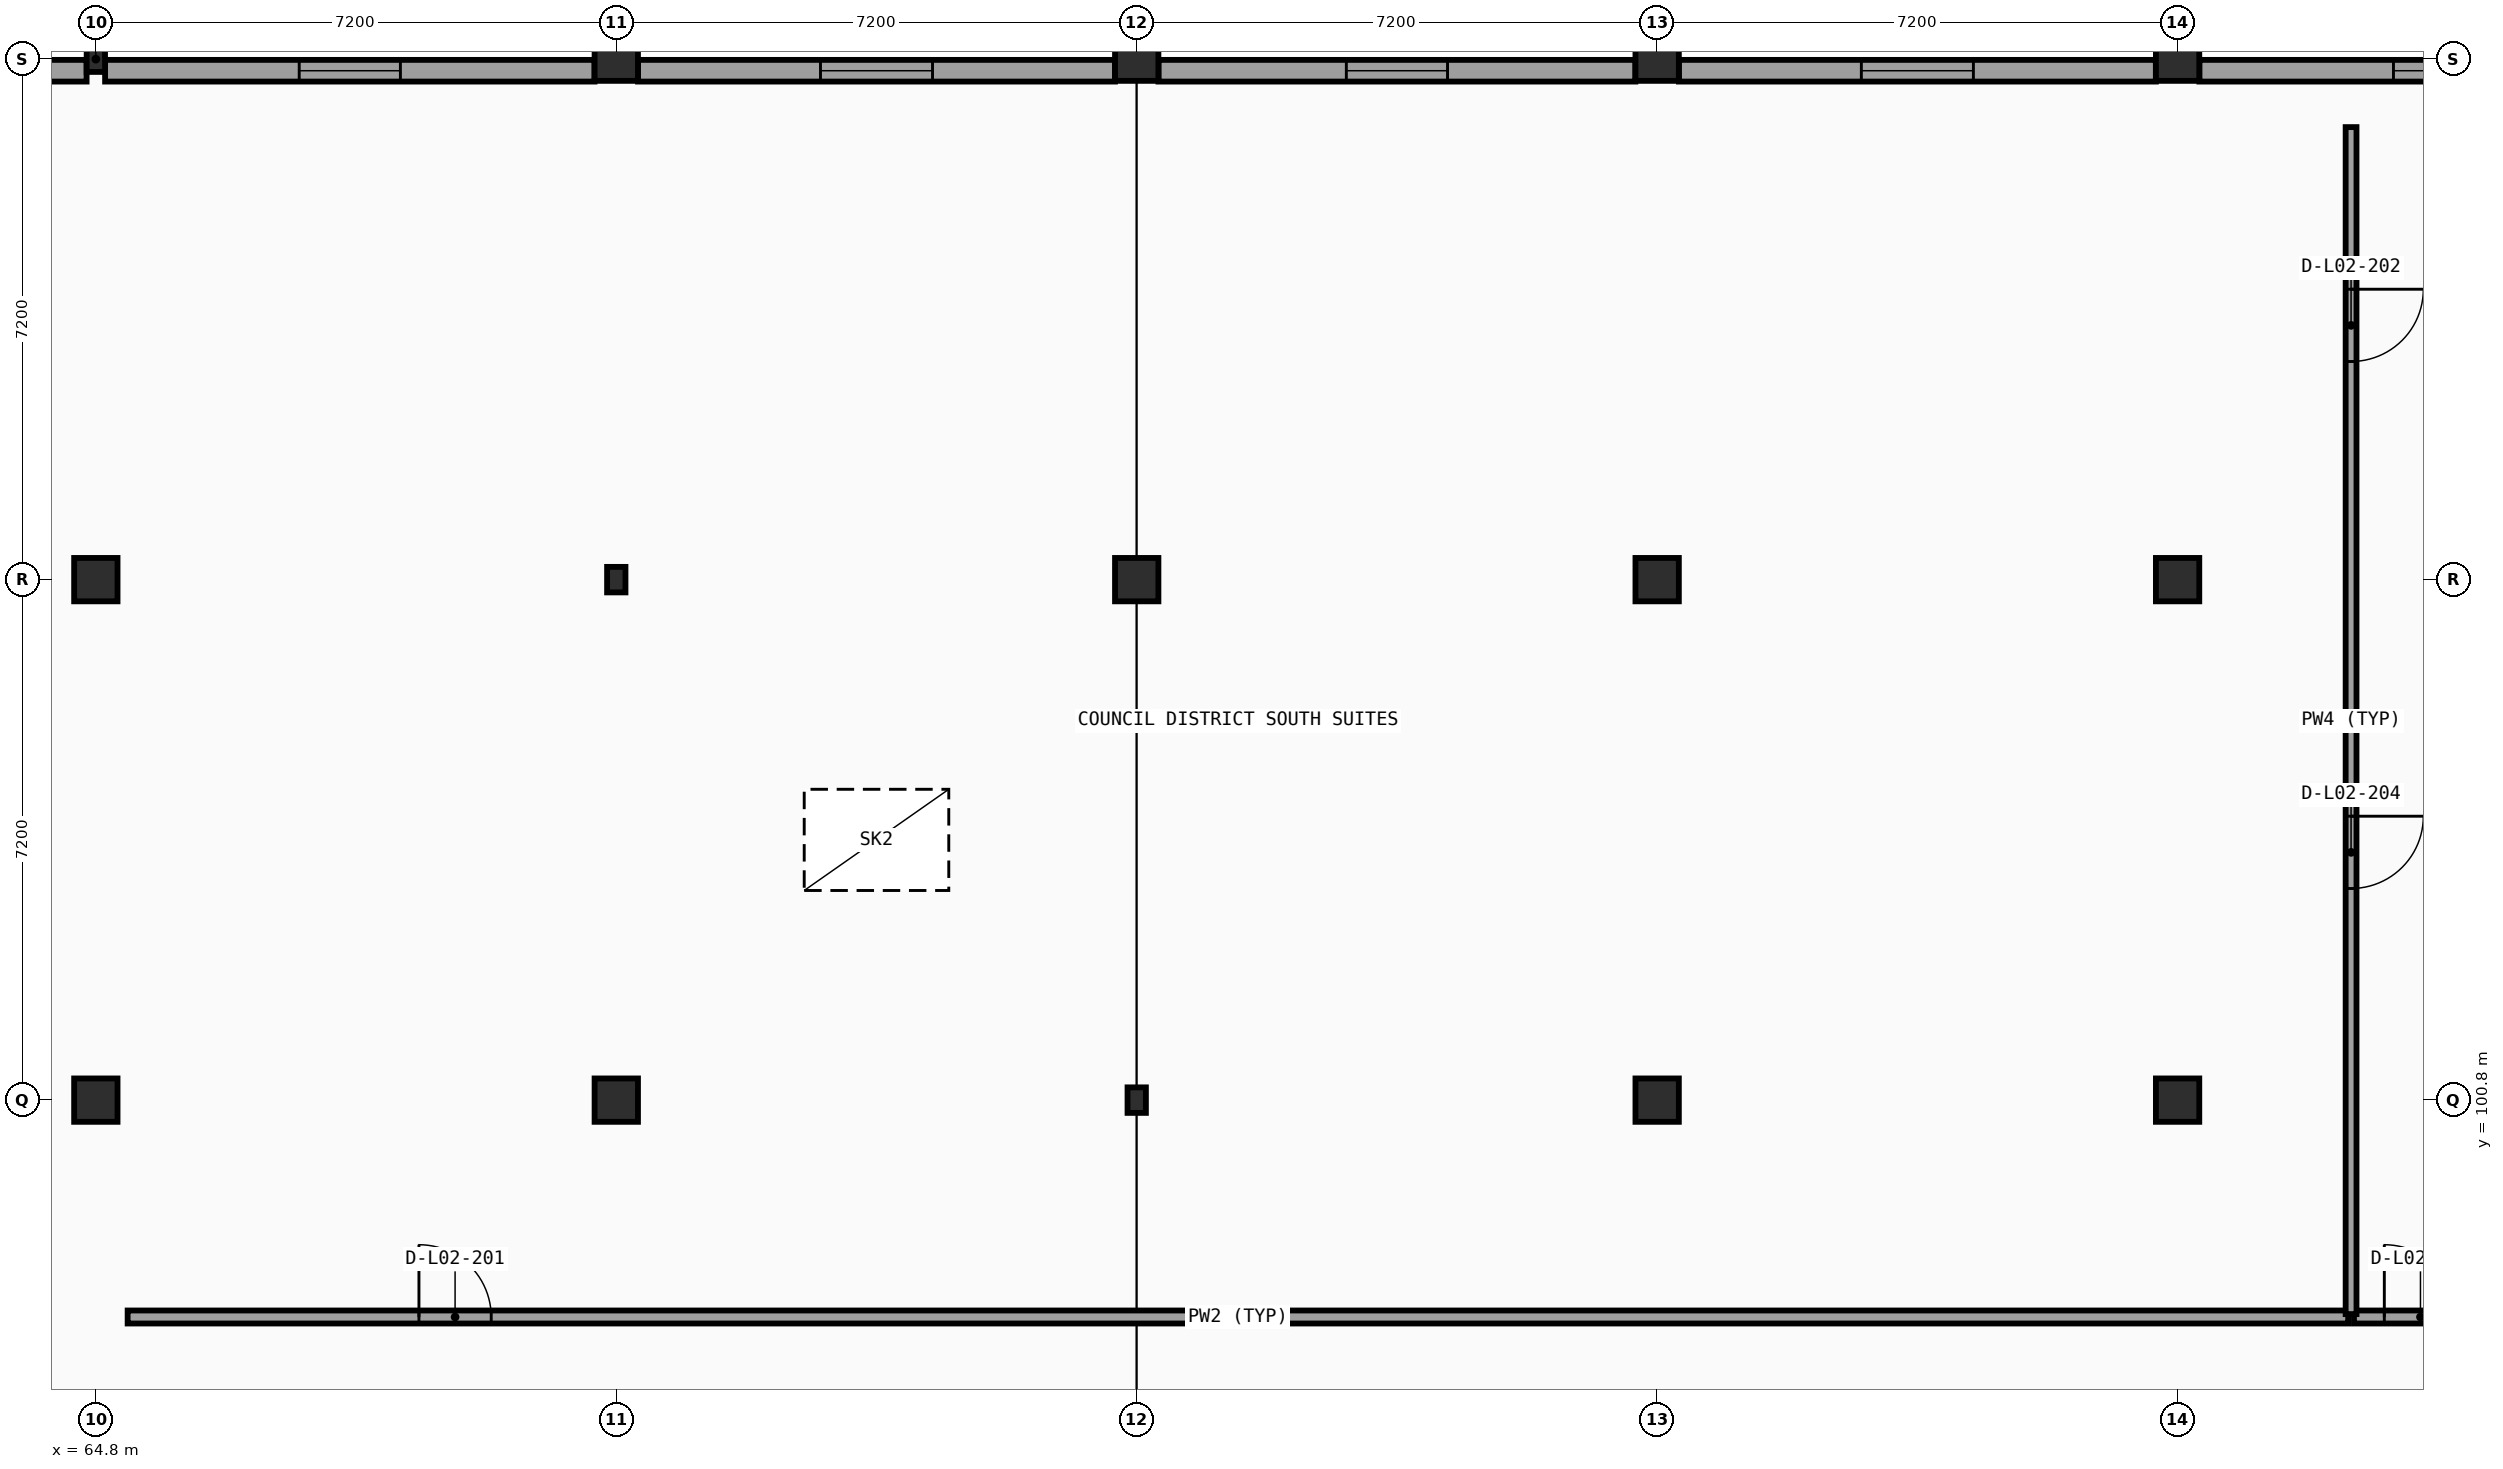
"""IFC4 building model, lengths in metres.
Left out: names, types, materials, properties, quantities, classifications, styles, units other than length and angle.
Written with IfcOpenShell. Run it as: python <this file> out.ifc"""

import sys

from ifc_helpers import new_model, si_unit, direction, frame, frame_2d, origin, origin_2d, place, context, subcontext, project, spatial, rectangle, i_section, extrude, element, fill, save


model = new_model("IFC4")
c1 = context("Model", 3, precision=1e-05, world=origin(), true_north=direction((0.0, 1.0)))
c2 = subcontext(c1, "Body", "Model", "MODEL_VIEW")
j1 = project(units=[si_unit("LENGTHUNIT", "METRE"), si_unit("PLANEANGLEUNIT", "RADIAN")], contexts=[c1])
p1 = place(None, origin())
s1 = spatial("IfcSite", under=j1, at=p1, CompositionType="ELEMENT")
p2 = place(p1, origin())
s2 = spatial("IfcBuilding", under=s1, at=p2, CompositionType="ELEMENT")
p3 = place(p2, frame((0.0, 0.0, 10.2)))
s3 = spatial("IfcBuildingStorey", under=s2, at=p3, CompositionType="ELEMENT", Elevation=10.2)
for number, where, z_axis, x_axis in (
    (1, (64.8, 100.8, 0.0), (0.0, 0.0, 1.0), (1.0, 0.0, 0.0)),
    (2, (64.8, 108.0, 0.0), (0.0, 0.0, 1.0), (1.0, 0.0, 0.0)),
):
    element("IfcColumn", number, at=place(p3, frame(where, z_axis=z_axis, x_axis=x_axis)), inside=s3, PredefinedType="COLUMN", context=c2, shape_type="SweptSolid", body=[
        extrude(rectangle(XDim=0.6, YDim=0.6, at=origin_2d()), origin(), (0.0, 0.0, 1.0), 4.5),
    ])
p4 = place(p3, frame((64.8, 115.2, 0.0), z_axis=(0.0, 0.0, 1.0), x_axis=(1.0, 0.0, 0.0)))
e3 = element("IfcColumn", 3, at=p4, inside=s3, PredefinedType="COLUMN", context=c2, shape_type="SweptSolid", body=[
    extrude(i_section(OverallWidth=0.254, OverallDepth=0.353, WebThickness=0.01, FlangeThickness=0.016, FilletRadius=0.015, at=origin_2d()), origin(), (0.0, 0.0, 1.0), 4.5),
])
p5 = place(p3, frame((72.0, 100.8, 0.0), z_axis=(0.0, 0.0, 1.0), x_axis=(1.0, 0.0, 0.0)))
e4 = element("IfcColumn", 4, at=p5, inside=s3, PredefinedType="COLUMN", context=c2, shape_type="SweptSolid", body=[
    extrude(rectangle(XDim=0.6, YDim=0.6, at=origin_2d()), origin(), (0.0, 0.0, 1.0), 4.5),
])
p6 = place(p3, frame((72.0, 108.0, 0.0), z_axis=(0.0, 0.0, 1.0), x_axis=(1.0, 0.0, 0.0)))
e5 = element("IfcColumn", 5, at=p6, inside=s3, PredefinedType="COLUMN", context=c2, shape_type="SweptSolid", body=[
    extrude(i_section(OverallWidth=0.254, OverallDepth=0.353, WebThickness=0.01, FlangeThickness=0.016, FilletRadius=0.015, at=origin_2d()), origin(), (0.0, 0.0, 1.0), 4.5),
])
p7 = place(p3, frame((72.0, 115.2, 0.0), z_axis=(0.0, 0.0, 1.0), x_axis=(1.0, 0.0, 0.0)))
e6 = element("IfcColumn", 6, at=p7, inside=s3, PredefinedType="COLUMN", context=c2, shape_type="SweptSolid", body=[
    extrude(rectangle(XDim=0.6, YDim=0.6, at=origin_2d()), origin(), (0.0, 0.0, 1.0), 4.5),
])
p8 = place(p3, frame((79.2, 100.8, 0.0), z_axis=(0.0, 0.0, 1.0), x_axis=(1.0, 0.0, 0.0)))
e7 = element("IfcColumn", 7, at=p8, inside=s3, PredefinedType="COLUMN", context=c2, shape_type="SweptSolid", body=[
    extrude(i_section(OverallWidth=0.254, OverallDepth=0.353, WebThickness=0.01, FlangeThickness=0.016, FilletRadius=0.015, at=origin_2d()), origin(), (0.0, 0.0, 1.0), 4.5),
])
for number, where, z_axis, x_axis in (
    (8, (79.2, 108.0, 0.0), (0.0, 0.0, 1.0), (1.0, 0.0, 0.0)),
    (9, (79.2, 115.2, 0.0), (0.0, 0.0, 1.0), (1.0, 0.0, 0.0)),
    (10, (86.4, 100.8, 0.0), (0.0, 0.0, 1.0), (1.0, 0.0, 0.0)),
    (11, (86.4, 108.0, 0.0), (0.0, 0.0, 1.0), (1.0, 0.0, 0.0)),
    (12, (86.4, 115.2, 0.0), (0.0, 0.0, 1.0), (1.0, 0.0, 0.0)),
    (13, (93.6, 100.8, 0.0), (0.0, 0.0, 1.0), (1.0, 0.0, 0.0)),
    (14, (93.6, 108.0, 0.0), (0.0, 0.0, 1.0), (1.0, 0.0, 0.0)),
    (15, (93.6, 115.2, 0.0), (0.0, 0.0, 1.0), (1.0, 0.0, 0.0)),
):
    element("IfcColumn", number, at=place(p3, frame(where, z_axis=z_axis, x_axis=x_axis)), inside=s3, PredefinedType="COLUMN", context=c2, shape_type="SweptSolid", body=[
        extrude(rectangle(XDim=0.6, YDim=0.6, at=origin_2d()), origin(), (0.0, 0.0, 1.0), 4.5),
    ])
p9 = place(p3, frame((57.901, 115.04, 0.0), z_axis=(0.0, 0.0, 1.0), x_axis=(1.0, 0.0, 0.0)))
e16 = element("IfcWall", 16, at=p9, inside=s3, PredefinedType="SOLIDWALL", context=c2, shape_type="SweptSolid", body=[
    extrude(rectangle(XDim=6.771, YDim=0.3, at=frame_2d((3.386, 0.0))), origin(), (0.0, 0.0, 1.0), 3.451),
])
p10 = place(p9, frame((2.611, 0.0, 0.85)))
e17 = element("IfcOpeningElement", 17, at=p10, cuts=e16, PredefinedType="OPENING", context=c2, shape_type="SweptSolid", body=[
    extrude(rectangle(XDim=1.55, YDim=1.65, at=frame_2d((0.775, 0.825))), frame((0.0, 0.16, 0.0), z_axis=(0.0, -1.0, 0.0), x_axis=(1.0, 0.0, 0.0)), (0.0, 0.0, 1.0), 0.32),
])
p11 = place(p3, frame((64.928, 115.04, 0.0), z_axis=(0.0, 0.0, 1.0), x_axis=(1.0, 0.0, 0.0)))
e18 = element("IfcWall", 18, at=p11, inside=s3, PredefinedType="SOLIDWALL", context=c2, shape_type="SweptSolid", body=[
    extrude(rectangle(XDim=6.771, YDim=0.3, at=frame_2d((3.385, 0.0))), origin(), (0.0, 0.0, 1.0), 3.451),
])
p12 = place(p11, frame((2.686, 0.0, 0.85)))
e19 = element("IfcOpeningElement", 19, at=p12, cuts=e18, PredefinedType="OPENING", context=c2, shape_type="SweptSolid", body=[
    extrude(rectangle(XDim=1.4, YDim=1.75, at=frame_2d((0.7, 0.875))), frame((0.0, 0.16, 0.0), z_axis=(0.0, -1.0, 0.0), x_axis=(1.0, 0.0, 0.0)), (0.0, 0.0, 1.0), 0.32),
])
p13 = place(p3, frame((72.301, 115.04, 0.0), z_axis=(0.0, 0.0, 1.0), x_axis=(1.0, 0.0, 0.0)))
e20 = element("IfcWall", 20, at=p13, inside=s3, PredefinedType="SOLIDWALL", context=c2, shape_type="SweptSolid", body=[
    extrude(rectangle(XDim=6.598, YDim=0.3, at=frame_2d((3.299, 0.0))), origin(), (0.0, 0.0, 1.0), 3.471),
])
p14 = place(p13, frame((2.524, 0.0, 0.85)))
e21 = element("IfcOpeningElement", 21, at=p14, cuts=e20, PredefinedType="OPENING", context=c2, shape_type="SweptSolid", body=[
    extrude(rectangle(XDim=1.55, YDim=1.65, at=frame_2d((0.775, 0.825))), frame((0.0, 0.16, 0.0), z_axis=(0.0, -1.0, 0.0), x_axis=(1.0, 0.0, 0.0)), (0.0, 0.0, 1.0), 0.32),
])
p15 = place(p3, frame((79.501, 115.04, 0.0), z_axis=(0.0, 0.0, 1.0), x_axis=(1.0, 0.0, 0.0)))
e22 = element("IfcWall", 22, at=p15, inside=s3, PredefinedType="SOLIDWALL", context=c2, shape_type="SweptSolid", body=[
    extrude(rectangle(XDim=6.598, YDim=0.3, at=frame_2d((3.299, 0.0))), origin(), (0.0, 0.0, 1.0), 3.471),
])
p16 = place(p15, frame((2.599, 0.0, 0.85)))
e23 = element("IfcOpeningElement", 23, at=p16, cuts=e22, PredefinedType="OPENING", context=c2, shape_type="SweptSolid", body=[
    extrude(rectangle(XDim=1.4, YDim=1.75, at=frame_2d((0.7, 0.875))), frame((0.0, 0.16, 0.0), z_axis=(0.0, -1.0, 0.0), x_axis=(1.0, 0.0, 0.0)), (0.0, 0.0, 1.0), 0.32),
])
p17 = place(p3, frame((86.701, 115.04, 0.0), z_axis=(0.0, 0.0, 1.0), x_axis=(1.0, 0.0, 0.0)))
e24 = element("IfcWall", 24, at=p17, inside=s3, PredefinedType="SOLIDWALL", context=c2, shape_type="SweptSolid", body=[
    extrude(rectangle(XDim=6.598, YDim=0.3, at=frame_2d((3.299, 0.0))), origin(), (0.0, 0.0, 1.0), 3.471),
])
p18 = place(p17, frame((2.524, 0.0, 0.85)))
e25 = element("IfcOpeningElement", 25, at=p18, cuts=e24, PredefinedType="OPENING", context=c2, shape_type="SweptSolid", body=[
    extrude(rectangle(XDim=1.55, YDim=1.65, at=frame_2d((0.775, 0.825))), frame((0.0, 0.16, 0.0), z_axis=(0.0, -1.0, 0.0), x_axis=(1.0, 0.0, 0.0)), (0.0, 0.0, 1.0), 0.32),
])
p19 = place(p3, frame((93.901, 115.04, 0.0), z_axis=(0.0, 0.0, 1.0), x_axis=(1.0, 0.0, 0.0)))
e26 = element("IfcWall", 26, at=p19, inside=s3, PredefinedType="SOLIDWALL", context=c2, shape_type="SweptSolid", body=[
    extrude(rectangle(XDim=6.771, YDim=0.3, at=frame_2d((3.386, 0.0))), origin(), (0.0, 0.0, 1.0), 3.451),
])
p20 = place(p19, frame((2.686, 0.0, 0.85)))
e27 = element("IfcOpeningElement", 27, at=p20, cuts=e26, PredefinedType="OPENING", context=c2, shape_type="SweptSolid", body=[
    extrude(rectangle(XDim=1.4, YDim=1.75, at=frame_2d((0.7, 0.875))), frame((0.0, 0.16, 0.0), z_axis=(0.0, -1.0, 0.0), x_axis=(1.0, 0.0, 0.0)), (0.0, 0.0, 1.0), 0.32),
])
p21 = place(p3, frame((65.24, 97.8, 0.0), z_axis=(0.0, 0.0, 1.0), x_axis=(1.0, 0.0, 0.0)))
e28 = element("IfcWall", 28, at=p21, inside=s3, PredefinedType="PARTITIONING", context=c2, shape_type="SweptSolid", body=[
    extrude(rectangle(XDim=30.72, YDim=0.18, at=frame_2d((15.36, 0.0))), origin(), (0.0, 0.0, 1.0), 3.451),
])
p22 = place(p21, frame((4.03, 0.0, 0.0)))
e29 = element("IfcOpeningElement", 29, at=p22, cuts=e28, PredefinedType="OPENING", context=c2, shape_type="SweptSolid", body=[
    extrude(rectangle(XDim=1.0, YDim=2.1, at=frame_2d((0.5, 1.05))), frame((0.0, 0.1, 0.0), z_axis=(0.0, -1.0, 0.0), x_axis=(1.0, 0.0, 0.0)), (0.0, 0.0, 1.0), 0.2),
])
p23 = place(p3, frame((96.04, 97.8, 0.0), z_axis=(0.0, 0.0, 1.0), x_axis=(1.0, 0.0, 0.0)))
e30 = element("IfcWall", 30, at=p23, inside=s3, PredefinedType="PARTITIONING", context=c2, shape_type="SweptSolid", body=[
    extrude(rectangle(XDim=32.62, YDim=0.18, at=frame_2d((16.31, 0.0))), origin(), (0.0, 0.0, 1.0), 3.451),
])
p24 = place(p23, frame((0.42, 0.0, 0.0)))
e31 = element("IfcOpeningElement", 31, at=p24, cuts=e30, PredefinedType="OPENING", context=c2, shape_type="SweptSolid", body=[
    extrude(rectangle(XDim=1.0, YDim=2.1, at=frame_2d((0.5, 1.05))), frame((0.0, 0.1, 0.0), z_axis=(0.0, -1.0, 0.0), x_axis=(1.0, 0.0, 0.0)), (0.0, 0.0, 1.0), 0.2),
])
p25 = place(p3, frame((96.0, 97.84, 0.0), z_axis=(0.0, 0.0, 1.0), x_axis=(0.0, 1.0, 0.0)))
e32 = element("IfcWall", 32, at=p25, inside=s3, PredefinedType="PARTITIONING", context=c2, shape_type="SweptSolid", body=[
    extrude(rectangle(XDim=16.42, YDim=0.15, at=frame_2d((8.21, 0.0))), origin(), (0.0, 0.0, 1.0), 3.618),
])
p26 = place(p25, frame((13.177, 0.0, 0.0)))
e33 = element("IfcOpeningElement", 33, at=p26, cuts=e32, PredefinedType="OPENING", context=c2, shape_type="SweptSolid", body=[
    extrude(rectangle(XDim=1.0, YDim=2.1, at=frame_2d((0.5, 1.05))), frame((0.0, 0.085, 0.0), z_axis=(0.0, -1.0, 0.0), x_axis=(1.0, 0.0, 0.0)), (0.0, 0.0, 1.0), 0.17),
])
p27 = place(p25, frame((5.887, 0.0, 0.0)))
e34 = element("IfcOpeningElement", 34, at=p27, cuts=e32, PredefinedType="OPENING", context=c2, shape_type="SweptSolid", body=[
    extrude(rectangle(XDim=1.0, YDim=2.1, at=frame_2d((0.5, 1.05))), frame((0.0, 0.085, 0.0), z_axis=(0.0, -1.0, 0.0), x_axis=(1.0, 0.0, 0.0)), (0.0, 0.0, 1.0), 0.17),
])
p28 = place(p12, origin())
e35 = element("IfcWindow", 35, at=p28, inside=s3, PartitioningType="SINGLE_PANEL", PredefinedType="WINDOW", context=c2, shape_type="SweptSolid", body=[
    extrude(rectangle(XDim=1.4, YDim=1.75, at=frame_2d((0.7, 0.875))), frame((0.0, 0.03, 0.0), z_axis=(0.0, -1.0, 0.0), x_axis=(1.0, 0.0, 0.0)), (0.0, 0.0, 1.0), 0.06),
])
fill(e19, e35)
p29 = place(p14, origin())
e36 = element("IfcWindow", 36, at=p29, inside=s3, PartitioningType="SINGLE_PANEL", PredefinedType="WINDOW", context=c2, shape_type="SweptSolid", body=[
    extrude(rectangle(XDim=1.55, YDim=1.65, at=frame_2d((0.775, 0.825))), frame((0.0, 0.03, 0.0), z_axis=(0.0, -1.0, 0.0), x_axis=(1.0, 0.0, 0.0)), (0.0, 0.0, 1.0), 0.06),
])
fill(e21, e36)
p30 = place(p16, origin())
e37 = element("IfcWindow", 37, at=p30, inside=s3, PartitioningType="SINGLE_PANEL", PredefinedType="WINDOW", context=c2, shape_type="SweptSolid", body=[
    extrude(rectangle(XDim=1.4, YDim=1.75, at=frame_2d((0.7, 0.875))), frame((0.0, 0.03, 0.0), z_axis=(0.0, -1.0, 0.0), x_axis=(1.0, 0.0, 0.0)), (0.0, 0.0, 1.0), 0.06),
])
fill(e23, e37)
p31 = place(p18, origin())
e38 = element("IfcWindow", 38, at=p31, inside=s3, PartitioningType="SINGLE_PANEL", PredefinedType="WINDOW", context=c2, shape_type="SweptSolid", body=[
    extrude(rectangle(XDim=1.55, YDim=1.65, at=frame_2d((0.775, 0.825))), frame((0.0, 0.03, 0.0), z_axis=(0.0, -1.0, 0.0), x_axis=(1.0, 0.0, 0.0)), (0.0, 0.0, 1.0), 0.06),
])
fill(e25, e38)
p32 = place(p20, origin())
e39 = element("IfcWindow", 39, at=p32, inside=s3, PartitioningType="SINGLE_PANEL", PredefinedType="WINDOW", context=c2, shape_type="SweptSolid", body=[
    extrude(rectangle(XDim=1.4, YDim=1.75, at=frame_2d((0.7, 0.875))), frame((0.0, 0.03, 0.0), z_axis=(0.0, -1.0, 0.0), x_axis=(1.0, 0.0, 0.0)), (0.0, 0.0, 1.0), 0.06),
])
fill(e27, e39)
p33 = place(p3, frame((0.0, 0.0, -0.28)))
p34 = place(p33, frame((75.6, 104.4, 0.0)))
p35 = place(p34, frame((0.0, 0.0, 0.23)))
e40 = element("IfcWindow", 40, at=p35, inside=s3, PartitioningType="SINGLE_PANEL", PredefinedType="SKYLIGHT", context=c2, shape_type="SweptSolid", body=[
    extrude(rectangle(XDim=2.0, YDim=1.4, at=origin_2d()), origin(), (0.0, 0.0, 1.0), 0.05),
])
p36 = place(p22, origin())
e41 = element("IfcDoor", 41, at=p36, inside=s3, OperationType="SINGLE_SWING_LEFT", PredefinedType="DOOR", context=c2, shape_type="SweptSolid", body=[
    extrude(rectangle(XDim=1.0, YDim=2.1, at=frame_2d((0.5, 1.05))), frame((0.0, 0.025, 0.0), z_axis=(0.0, -1.0, 0.0), x_axis=(1.0, 0.0, 0.0)), (0.0, 0.0, 1.0), 0.05),
])
fill(e29, e41)
p37 = place(p26, origin())
e42 = element("IfcDoor", 42, at=p37, inside=s3, OperationType="SINGLE_SWING_RIGHT", PredefinedType="DOOR", context=c2, shape_type="SweptSolid", body=[
    extrude(rectangle(XDim=1.0, YDim=2.1, at=frame_2d((0.5, 1.05))), frame((0.0, 0.025, 0.0), z_axis=(0.0, -1.0, 0.0), x_axis=(1.0, 0.0, 0.0)), (0.0, 0.0, 1.0), 0.05),
])
fill(e33, e42)
p38 = place(p24, origin())
e43 = element("IfcDoor", 43, at=p38, inside=s3, OperationType="SINGLE_SWING_LEFT", PredefinedType="DOOR", context=c2, shape_type="SweptSolid", body=[
    extrude(rectangle(XDim=1.0, YDim=2.1, at=frame_2d((0.5, 1.05))), frame((0.0, 0.025, 0.0), z_axis=(0.0, -1.0, 0.0), x_axis=(1.0, 0.0, 0.0)), (0.0, 0.0, 1.0), 0.05),
])
fill(e31, e43)
p39 = place(p27, origin())
e44 = element("IfcDoor", 44, at=p39, inside=s3, OperationType="SINGLE_SWING_RIGHT", PredefinedType="DOOR", context=c2, shape_type="SweptSolid", body=[
    extrude(rectangle(XDim=1.0, YDim=2.1, at=frame_2d((0.5, 1.05))), frame((0.0, 0.025, 0.0), z_axis=(0.0, -1.0, 0.0), x_axis=(1.0, 0.0, 0.0)), (0.0, 0.0, 1.0), 0.05),
])
fill(e34, e44)
save(model, sys.argv[1])
